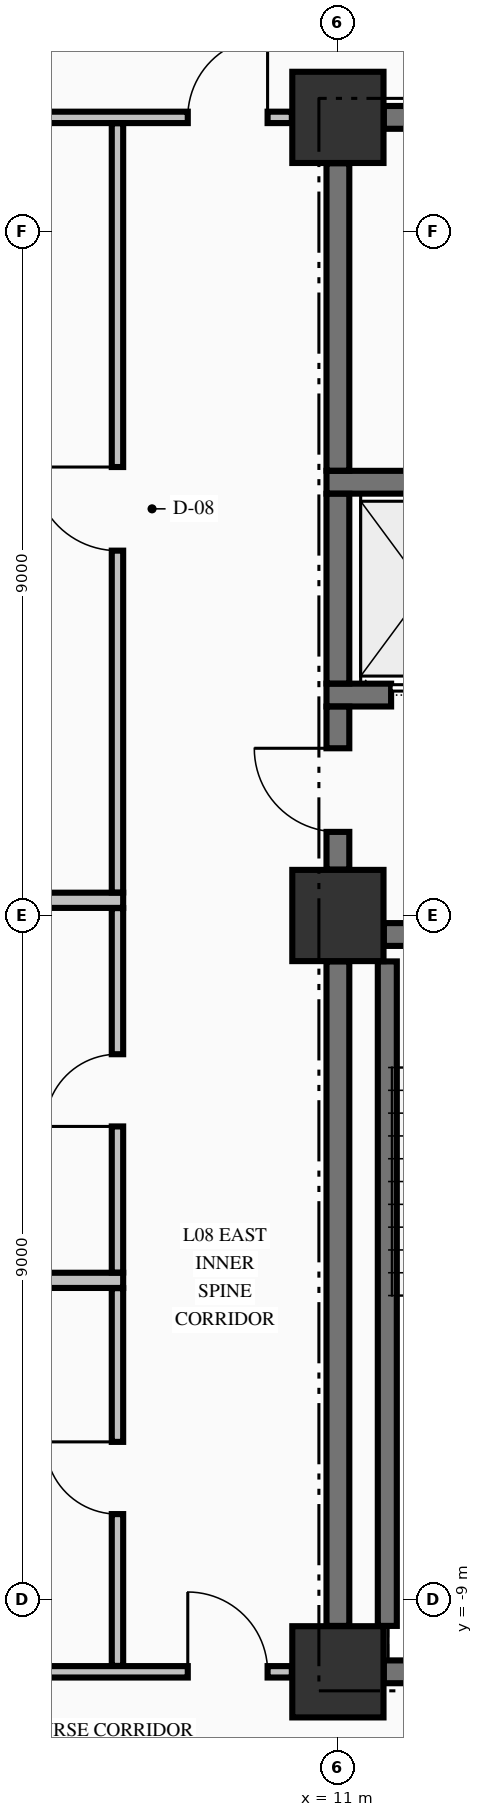
"""IFC4 building model, lengths in metres.
Left out: names, types, materials, properties, quantities, classifications, styles, units other than length and angle.
Written with IfcOpenShell. Run it as: python <this file> out.ifc"""

import sys

from ifc_helpers import new_model, si_unit, direction, frame, frame_2d, origin, origin_2d, place, context, subcontext, project, spatial, rectangle, extrude, element, fill, save


model = new_model("IFC4")
c1 = context("Model", 3, precision=1e-05, world=origin(), true_north=direction((0.0, 1.0)))
c2 = subcontext(c1, "Body", "Model", "MODEL_VIEW")
j1 = project(units=[si_unit("LENGTHUNIT", "METRE"), si_unit("PLANEANGLEUNIT", "RADIAN")], contexts=[c1])
p1 = place(None, origin())
s1 = spatial("IfcSite", under=j1, at=p1, CompositionType="ELEMENT")
p2 = place(p1, origin())
s2 = spatial("IfcBuilding", under=s1, at=p2, CompositionType="ELEMENT")
p3 = place(p2, frame((0.0, 0.0, 37.91)))
s3 = spatial("IfcBuildingStorey", under=s2, at=p3, CompositionType="ELEMENT", Elevation=37.91)
for number, where, z_axis, x_axis in (
    (1, (11.0, -9.95, -0.25), (0.0, 0.0, 1.0), (1.0, 0.0, 0.0)),
    (2, (11.0, 0.0, -0.25), (0.0, 0.0, 1.0), (1.0, 0.0, 0.0)),
    (3, (11.0, 10.5, -0.25), (0.0, 0.0, 1.0), (1.0, 0.0, 0.0)),
):
    element("IfcColumn", number, at=place(p3, frame(where, z_axis=z_axis, x_axis=x_axis)), inside=s3, PredefinedType="COLUMN", context=c2, shape_type="SweptSolid", body=[
        extrude(rectangle(XDim=1.2, YDim=1.2, at=origin_2d()), origin(), (0.0, 0.0, 1.0), 3.57),
    ])
p4 = place(p3, frame((11.604, -9.95, 0.0), z_axis=(0.0, 0.0, 1.0), x_axis=(1.0, 0.0, 0.0)))
e4 = element("IfcWall", 4, at=p4, inside=s3, PredefinedType="SHEAR", context=c2, shape_type="SweptSolid", body=[
    extrude(rectangle(XDim=3.096, YDim=0.3, at=frame_2d((1.548, 0.0))), origin(), (0.0, 0.0, 1.0), 3.32),
])
p5 = place(p3, frame((11.604, -0.25, 0.0), z_axis=(0.0, 0.0, 1.0), x_axis=(1.0, 0.0, 0.0)))
e5 = element("IfcWall", 5, at=p5, inside=s3, PredefinedType="SHEAR", context=c2, shape_type="SweptSolid", body=[
    extrude(rectangle(XDim=3.271, YDim=0.3, at=frame_2d((1.635, 0.0))), origin(), (0.0, 0.0, 1.0), 3.32),
])
p6 = place(p5, frame((0.996, 0.0, 0.0)))
e6 = element("IfcOpeningElement", 6, at=p6, cuts=e5, PredefinedType="OPENING", context=c2, shape_type="SweptSolid", body=[
    extrude(rectangle(XDim=1.1, YDim=2.15, at=frame_2d((0.55, 1.075))), frame((0.0, 0.16, 0.0), z_axis=(0.0, -1.0, 0.0), x_axis=(1.0, 0.0, 0.0)), (0.0, 0.0, 1.0), 0.32),
])
p7 = place(p3, frame((10.85, 2.9, 0.0), z_axis=(0.0, 0.0, 1.0), x_axis=(1.0, 0.0, 0.0)))
e7 = element("IfcWall", 7, at=p7, inside=s3, PredefinedType="SHEAR", context=c2, shape_type="SweptSolid", body=[
    extrude(rectangle(XDim=4.025, YDim=0.3, at=frame_2d((2.012, 0.0))), origin(), (0.0, 0.0, 1.0), 3.32),
])
p8 = place(p7, frame((0.85, 0.0, 0.0)))
e8 = element("IfcOpeningElement", 8, at=p8, cuts=e7, PredefinedType="OPENING", context=c2, shape_type="SweptSolid", body=[
    extrude(rectangle(XDim=1.1, YDim=2.2, at=frame_2d((0.55, 1.1))), frame((0.0, 0.16, 0.0), z_axis=(0.0, -1.0, 0.0), x_axis=(1.0, 0.0, 0.0)), (0.0, 0.0, 1.0), 0.32),
])
p9 = place(p3, frame((10.85, 5.7, 0.0), z_axis=(0.0, 0.0, 1.0), x_axis=(1.0, 0.0, 0.0)))
e9 = element("IfcWall", 9, at=p9, inside=s3, PredefinedType="SHEAR", context=c2, shape_type="SweptSolid", body=[
    extrude(rectangle(XDim=4.025, YDim=0.3, at=frame_2d((2.012, 0.0))), origin(), (0.0, 0.0, 1.0), 3.32),
])
p10 = place(p3, frame((11.604, 10.5, 0.0), z_axis=(0.0, 0.0, 1.0), x_axis=(1.0, 0.0, 0.0)))
e10 = element("IfcWall", 10, at=p10, inside=s3, PredefinedType="SHEAR", context=c2, shape_type="SweptSolid", body=[
    extrude(rectangle(XDim=3.096, YDim=0.3, at=frame_2d((1.548, 0.0))), origin(), (0.0, 0.0, 1.0), 3.32),
])
p11 = place(p10, frame((1.901, 0.0, 0.0)))
e11 = element("IfcOpeningElement", 11, at=p11, cuts=e10, PredefinedType="OPENING", context=c2, shape_type="SweptSolid", body=[
    extrude(rectangle(XDim=0.95, YDim=2.15, at=frame_2d((0.475, 1.075))), frame((0.0, 0.16, 0.0), z_axis=(0.0, -1.0, 0.0), x_axis=(1.0, 0.0, 0.0)), (0.0, 0.0, 1.0), 0.32),
])
p12 = place(p3, frame((-10.394, -9.95, 0.0), z_axis=(0.0, 0.0, 1.0), x_axis=(1.0, 0.0, 0.0)))
e12 = element("IfcWall", 12, at=p12, inside=s3, PredefinedType="PARTITIONING", context=c2, shape_type="SweptSolid", body=[
    extrude(rectangle(XDim=20.788, YDim=0.15, at=frame_2d((10.394, 0.0))), origin(), (0.0, 0.0, 1.0), 3.32),
])
p13 = place(p12, frame((0.319, 0.0, 0.0)))
e13 = element("IfcOpeningElement", 13, at=p13, cuts=e12, PredefinedType="OPENING", context=c2, shape_type="SweptSolid", body=[
    extrude(rectangle(XDim=1.05, YDim=2.15, at=frame_2d((0.525, 1.075))), frame((0.0, 0.085, 0.0), z_axis=(0.0, -1.0, 0.0), x_axis=(1.0, 0.0, 0.0)), (0.0, 0.0, 1.0), 0.17),
])
p14 = place(p12, frame((19.419, 0.0, 0.0)))
e14 = element("IfcOpeningElement", 14, at=p14, cuts=e12, PredefinedType="OPENING", context=c2, shape_type="SweptSolid", body=[
    extrude(rectangle(XDim=1.05, YDim=2.15, at=frame_2d((0.525, 1.075))), frame((0.0, 0.085, 0.0), z_axis=(0.0, -1.0, 0.0), x_axis=(1.0, 0.0, 0.0)), (0.0, 0.0, 1.0), 0.17),
])
p15 = place(p12, frame((11.569, 0.0, 0.0)))
e15 = element("IfcOpeningElement", 15, at=p15, cuts=e12, PredefinedType="OPENING", context=c2, shape_type="SweptSolid", body=[
    extrude(rectangle(XDim=0.95, YDim=2.15, at=frame_2d((0.475, 1.075))), frame((0.0, 0.085, 0.0), z_axis=(0.0, -1.0, 0.0), x_axis=(1.0, 0.0, 0.0)), (0.0, 0.0, 1.0), 0.17),
])
for number, where, z_axis, x_axis in (
    (16, (-1.9, -4.8, 0.0), (0.0, 0.0, 1.0), (1.0, 0.0, 0.0)),
    (17, (-1.9, 0.2, 0.0), (0.0, 0.0, 1.0), (1.0, 0.0, 0.0)),
):
    element("IfcWall", number, at=place(p3, frame(where, z_axis=z_axis, x_axis=x_axis)), inside=s3, PredefinedType="PARTITIONING", context=c2, shape_type="SweptSolid", body=[
        extrude(rectangle(XDim=10.075, YDim=0.2, at=frame_2d((5.038, 0.0))), origin(), (0.0, 0.0, 1.0), 3.32),
    ])
p16 = place(p3, frame((-10.394, 10.5, 0.0), z_axis=(0.0, 0.0, 1.0), x_axis=(1.0, 0.0, 0.0)))
e18 = element("IfcWall", 18, at=p16, inside=s3, PredefinedType="PARTITIONING", context=c2, shape_type="SweptSolid", body=[
    extrude(rectangle(XDim=20.788, YDim=0.15, at=frame_2d((10.394, 0.0))), origin(), (0.0, 0.0, 1.0), 3.32),
])
p17 = place(p16, frame((0.319, 0.0, 0.0)))
e19 = element("IfcOpeningElement", 19, at=p17, cuts=e18, PredefinedType="OPENING", context=c2, shape_type="SweptSolid", body=[
    extrude(rectangle(XDim=1.05, YDim=2.15, at=frame_2d((0.525, 1.075))), frame((0.0, 0.085, 0.0), z_axis=(0.0, -1.0, 0.0), x_axis=(1.0, 0.0, 0.0)), (0.0, 0.0, 1.0), 0.17),
])
p18 = place(p16, frame((19.419, 0.0, 0.0)))
e20 = element("IfcOpeningElement", 20, at=p18, cuts=e18, PredefinedType="OPENING", context=c2, shape_type="SweptSolid", body=[
    extrude(rectangle(XDim=1.05, YDim=2.15, at=frame_2d((0.525, 1.075))), frame((0.0, 0.085, 0.0), z_axis=(0.0, -1.0, 0.0), x_axis=(1.0, 0.0, 0.0)), (0.0, 0.0, 1.0), 0.17),
])
p19 = place(p3, frame((11.0, -9.346, 0.0), z_axis=(0.0, 0.0, 1.0), x_axis=(0.0, 1.0, 0.0)))
e21 = element("IfcWall", 21, at=p19, inside=s3, PredefinedType="SHEAR", context=c2, shape_type="SweptSolid", body=[
    extrude(rectangle(XDim=8.742, YDim=0.3, at=frame_2d((4.371, 0.0))), origin(), (0.0, 0.0, 1.0), 3.32),
])
p20 = place(p3, frame((11.0, 0.604, 0.0), z_axis=(0.0, 0.0, 1.0), x_axis=(0.0, 1.0, 0.0)))
e22 = element("IfcWall", 22, at=p20, inside=s3, PredefinedType="SHEAR", context=c2, shape_type="SweptSolid", body=[
    extrude(rectangle(XDim=2.144, YDim=0.3, at=frame_2d((1.072, 0.0))), origin(), (0.0, 0.0, 1.0), 3.32),
])
p21 = place(p20, frame((0.496, 0.0, 0.0)))
e23 = element("IfcOpeningElement", 23, at=p21, cuts=e22, PredefinedType="OPENING", context=c2, shape_type="SweptSolid", body=[
    extrude(rectangle(XDim=1.1, YDim=2.15, at=frame_2d((0.55, 1.075))), frame((0.0, 0.16, 0.0), z_axis=(0.0, -1.0, 0.0), x_axis=(1.0, 0.0, 0.0)), (0.0, 0.0, 1.0), 0.32),
])
p22 = place(p3, frame((11.0, 3.052, 0.0), z_axis=(0.0, 0.0, 1.0), x_axis=(0.0, 1.0, 0.0)))
e24 = element("IfcWall", 24, at=p22, inside=s3, PredefinedType="SHEAR", context=c2, shape_type="SweptSolid", body=[
    extrude(rectangle(XDim=2.496, YDim=0.3, at=frame_2d((1.248, 0.0))), origin(), (0.0, 0.0, 1.0), 3.32),
])
p23 = place(p3, frame((11.0, 5.852, 0.0), z_axis=(0.0, 0.0, 1.0), x_axis=(0.0, 1.0, 0.0)))
e25 = element("IfcWall", 25, at=p23, inside=s3, PredefinedType="SHEAR", context=c2, shape_type="SweptSolid", body=[
    extrude(rectangle(XDim=4.044, YDim=0.3, at=frame_2d((2.022, 0.0))), origin(), (0.0, 0.0, 1.0), 3.32),
])
p24 = place(p3, frame((11.65, -9.346, 0.0), z_axis=(0.0, 0.0, 1.0), x_axis=(0.0, 1.0, 0.0)))
e26 = element("IfcWall", 26, at=p24, inside=s3, PredefinedType="SOLIDWALL", context=c2, shape_type="SweptSolid", body=[
    extrude(rectangle(XDim=8.742, YDim=0.25, at=frame_2d((4.371, 0.0))), origin(), (0.0, 0.0, 1.0), 3.32),
])
p25 = place(p3, frame((8.1, -9.872, 0.0), z_axis=(0.0, 0.0, 1.0), x_axis=(0.0, 1.0, 0.0)))
e27 = element("IfcWall", 27, at=p25, inside=s3, PredefinedType="PARTITIONING", context=c2, shape_type="SweptSolid", body=[
    extrude(rectangle(XDim=4.969, YDim=0.15, at=frame_2d((2.484, 0.0))), origin(), (0.0, 0.0, 1.0), 3.32),
])
p26 = place(p25, frame((1.997, 0.0, 0.0)))
e28 = element("IfcOpeningElement", 28, at=p26, cuts=e27, PredefinedType="OPENING", context=c2, shape_type="SweptSolid", body=[
    extrude(rectangle(XDim=0.95, YDim=2.15, at=frame_2d((0.475, 1.075))), frame((0.0, 0.085, 0.0), z_axis=(0.0, -1.0, 0.0), x_axis=(1.0, 0.0, 0.0)), (0.0, 0.0, 1.0), 0.17),
])
p27 = place(p3, frame((8.1, -4.697, 0.0), z_axis=(0.0, 0.0, 1.0), x_axis=(0.0, 1.0, 0.0)))
e29 = element("IfcWall", 29, at=p27, inside=s3, PredefinedType="PARTITIONING", context=c2, shape_type="SweptSolid", body=[
    extrude(rectangle(XDim=4.794, YDim=0.15, at=frame_2d((2.397, 0.0))), origin(), (0.0, 0.0, 1.0), 3.32),
])
p28 = place(p27, frame((1.922, 0.0, 0.0)))
e30 = element("IfcOpeningElement", 30, at=p28, cuts=e29, PredefinedType="OPENING", context=c2, shape_type="SweptSolid", body=[
    extrude(rectangle(XDim=0.95, YDim=2.15, at=frame_2d((0.475, 1.075))), frame((0.0, 0.085, 0.0), z_axis=(0.0, -1.0, 0.0), x_axis=(1.0, 0.0, 0.0)), (0.0, 0.0, 1.0), 0.17),
])
p29 = place(p3, frame((8.1, 0.303, 0.0), z_axis=(0.0, 0.0, 1.0), x_axis=(0.0, 1.0, 0.0)))
e31 = element("IfcWall", 31, at=p29, inside=s3, PredefinedType="PARTITIONING", context=c2, shape_type="SweptSolid", body=[
    extrude(rectangle(XDim=10.119, YDim=0.15, at=frame_2d((5.06, 0.0))), origin(), (0.0, 0.0, 1.0), 3.32),
])
p30 = place(p29, frame((4.497, 0.0, 0.0)))
e32 = element("IfcOpeningElement", 32, at=p30, cuts=e31, PredefinedType="OPENING", context=c2, shape_type="SweptSolid", body=[
    extrude(rectangle(XDim=1.1, YDim=2.15, at=frame_2d((0.55, 1.075))), frame((0.0, 0.085, 0.0), z_axis=(0.0, -1.0, 0.0), x_axis=(1.0, 0.0, 0.0)), (0.0, 0.0, 1.0), 0.17),
])
p31 = place(p21, origin())
e33 = element("IfcDoor", 33, at=p31, inside=s3, OperationType="SINGLE_SWING_RIGHT", PredefinedType="DOOR", context=c2, shape_type="SweptSolid", body=[
    extrude(rectangle(XDim=1.1, YDim=2.15, at=frame_2d((0.55, 1.075))), frame((0.0, 0.025, 0.0), z_axis=(0.0, -1.0, 0.0), x_axis=(1.0, 0.0, 0.0)), (0.0, 0.0, 1.0), 0.05),
])
fill(e23, e33)
p32 = place(p8, origin())
e34 = element("IfcDoor", 34, at=p32, inside=s3, OperationType="SLIDING_TO_RIGHT", PredefinedType="DOOR", context=c2, shape_type="SweptSolid", body=[
    extrude(rectangle(XDim=1.1, YDim=2.2, at=frame_2d((0.55, 1.1))), frame((0.0, 0.025, 0.0), z_axis=(0.0, -1.0, 0.0), x_axis=(1.0, 0.0, 0.0)), (0.0, 0.0, 1.0), 0.05),
])
fill(e8, e34)
p33 = place(p18, origin())
e35 = element("IfcDoor", 35, at=p33, inside=s3, OperationType="SINGLE_SWING_RIGHT", PredefinedType="DOOR", context=c2, shape_type="SweptSolid", body=[
    extrude(rectangle(XDim=1.05, YDim=2.15, at=frame_2d((0.525, 1.075))), frame((0.0, 0.025, 0.0), z_axis=(0.0, -1.0, 0.0), x_axis=(1.0, 0.0, 0.0)), (0.0, 0.0, 1.0), 0.05),
])
fill(e20, e35)
p34 = place(p14, origin())
e36 = element("IfcDoor", 36, at=p34, inside=s3, OperationType="SINGLE_SWING_LEFT", PredefinedType="DOOR", context=c2, shape_type="SweptSolid", body=[
    extrude(rectangle(XDim=1.05, YDim=2.15, at=frame_2d((0.525, 1.075))), frame((0.0, 0.025, 0.0), z_axis=(0.0, -1.0, 0.0), x_axis=(1.0, 0.0, 0.0)), (0.0, 0.0, 1.0), 0.05),
])
fill(e14, e36)
p35 = place(p30, origin())
e37 = element("IfcDoor", 37, at=p35, inside=s3, OperationType="SINGLE_SWING_RIGHT", PredefinedType="DOOR", context=c2, shape_type="SweptSolid", body=[
    extrude(rectangle(XDim=1.1, YDim=2.15, at=frame_2d((0.55, 1.075))), frame((0.0, 0.025, 0.0), z_axis=(0.0, -1.0, 0.0), x_axis=(1.0, 0.0, 0.0)), (0.0, 0.0, 1.0), 0.05),
])
fill(e32, e37)
p36 = place(p28, origin())
e38 = element("IfcDoor", 38, at=p36, inside=s3, OperationType="SINGLE_SWING_LEFT", PredefinedType="DOOR", context=c2, shape_type="SweptSolid", body=[
    extrude(rectangle(XDim=0.95, YDim=2.15, at=frame_2d((0.475, 1.075))), frame((0.0, 0.025, 0.0), z_axis=(0.0, -1.0, 0.0), x_axis=(1.0, 0.0, 0.0)), (0.0, 0.0, 1.0), 0.05),
])
fill(e30, e38)
p37 = place(p26, origin())
e39 = element("IfcDoor", 39, at=p37, inside=s3, OperationType="SINGLE_SWING_RIGHT", PredefinedType="DOOR", context=c2, shape_type="SweptSolid", body=[
    extrude(rectangle(XDim=0.95, YDim=2.15, at=frame_2d((0.475, 1.075))), frame((0.0, 0.025, 0.0), z_axis=(0.0, -1.0, 0.0), x_axis=(1.0, 0.0, 0.0)), (0.0, 0.0, 1.0), 0.05),
])
fill(e28, e39)
save(model, sys.argv[1])
